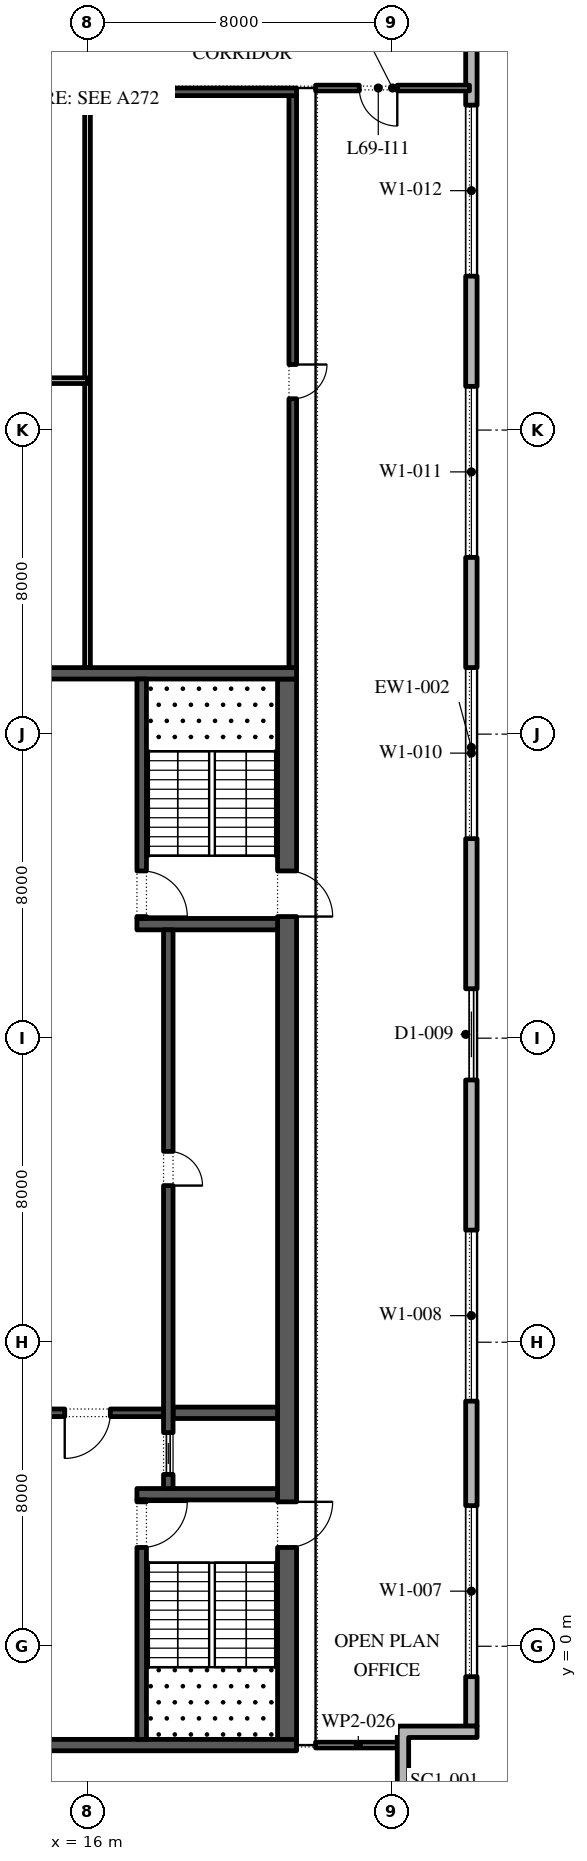
"""IFC4 building model, lengths in metres.
Left out: names, types, materials, properties, quantities, classifications, styles, units other than length and angle.
Written with IfcOpenShell. Run it as: python <this file> out.ifc"""

import sys

from ifc_helpers import new_model, si_unit, direction, frame, frame_2d, origin, place, context, subcontext, project, spatial, polyline, rectangle, outline, extrude, element, fill, save


model = new_model("IFC4")
c1 = context("Model", 3, precision=1e-05, world=origin(), true_north=direction((0.0, 1.0)))
c2 = subcontext(c1, "Body", "Model", "MODEL_VIEW")
j1 = project(units=[si_unit("LENGTHUNIT", "METRE"), si_unit("PLANEANGLEUNIT", "RADIAN")], contexts=[c1])
p1 = place(None, origin())
s1 = spatial("IfcSite", under=j1, at=p1, CompositionType="ELEMENT")
p2 = place(p1, origin())
s2 = spatial("IfcBuilding", under=s1, at=p2, CompositionType="ELEMENT")
p3 = place(p2, frame((0.0, 0.0, 317.4)))
s3 = spatial("IfcBuildingStorey", under=s2, at=p3, CompositionType="ELEMENT", Elevation=317.4)
p4 = place(p3, frame((26.1, -2.1, 0.0), z_axis=(0.0, 0.0, 1.0), x_axis=(0.0, 1.0, 0.0)))
e1 = element("IfcWall", 1, at=p4, inside=s3, PredefinedType="STANDARD", context=c2, shape_type="SweptSolid", body=[
    extrude(rectangle(XDim=51.5, YDim=0.3, at=frame_2d((25.75, 0.0))), origin(), (0.0, 0.0, 1.0), 4.0),
])
p5 = place(p4, frame((1.3, 0.0, 0.45)))
e2 = element("IfcOpeningElement", 2, at=p5, cuts=e1, PredefinedType="OPENING", context=c2, shape_type="SweptSolid", body=[
    extrude(rectangle(XDim=4.5, YDim=3.05, at=frame_2d((2.25, 1.525))), frame((0.0, 0.16, 0.0), z_axis=(0.0, -1.0, 0.0), x_axis=(1.0, 0.0, 0.0)), (0.0, 0.0, 1.0), 0.32),
])
p6 = place(p4, frame((8.55, 0.0, 0.45)))
e3 = element("IfcOpeningElement", 3, at=p6, cuts=e1, PredefinedType="OPENING", context=c2, shape_type="SweptSolid", body=[
    extrude(rectangle(XDim=4.5, YDim=3.05, at=frame_2d((2.25, 1.525))), frame((0.0, 0.16, 0.0), z_axis=(0.0, -1.0, 0.0), x_axis=(1.0, 0.0, 0.0)), (0.0, 0.0, 1.0), 0.32),
])
p7 = place(p4, frame((17.0, 0.0, 0.0)))
e4 = element("IfcOpeningElement", 4, at=p7, cuts=e1, PredefinedType="OPENING", context=c2, shape_type="SweptSolid", body=[
    extrude(rectangle(XDim=2.4, YDim=3.5, at=frame_2d((1.2, 1.75))), frame((0.0, 0.16, 0.0), z_axis=(0.0, -1.0, 0.0), x_axis=(1.0, 0.0, 0.0)), (0.0, 0.0, 1.0), 0.32),
])
p8 = place(p4, frame((23.35, 0.0, 0.45)))
e5 = element("IfcOpeningElement", 5, at=p8, cuts=e1, PredefinedType="OPENING", context=c2, shape_type="SweptSolid", body=[
    extrude(rectangle(XDim=4.5, YDim=3.05, at=frame_2d((2.25, 1.525))), frame((0.0, 0.16, 0.0), z_axis=(0.0, -1.0, 0.0), x_axis=(1.0, 0.0, 0.0)), (0.0, 0.0, 1.0), 0.32),
])
p9 = place(p4, frame((30.75, 0.0, 0.45)))
e6 = element("IfcOpeningElement", 6, at=p9, cuts=e1, PredefinedType="OPENING", context=c2, shape_type="SweptSolid", body=[
    extrude(rectangle(XDim=4.5, YDim=3.05, at=frame_2d((2.25, 1.525))), frame((0.0, 0.16, 0.0), z_axis=(0.0, -1.0, 0.0), x_axis=(1.0, 0.0, 0.0)), (0.0, 0.0, 1.0), 0.32),
])
p10 = place(p4, frame((38.15, 0.0, 0.45)))
e7 = element("IfcOpeningElement", 7, at=p10, cuts=e1, PredefinedType="OPENING", context=c2, shape_type="SweptSolid", body=[
    extrude(rectangle(XDim=4.5, YDim=3.05, at=frame_2d((2.25, 1.525))), frame((0.0, 0.16, 0.0), z_axis=(0.0, -1.0, 0.0), x_axis=(1.0, 0.0, 0.0)), (0.0, 0.0, 1.0), 0.32),
])
p11 = place(p4, frame((46.6, 0.0, 0.0)))
e8 = element("IfcOpeningElement", 8, at=p11, cuts=e1, PredefinedType="OPENING", context=c2, shape_type="SweptSolid", body=[
    extrude(rectangle(XDim=2.4, YDim=3.5, at=frame_2d((1.2, 1.75))), frame((0.0, 0.16, 0.0), z_axis=(0.0, -1.0, 0.0), x_axis=(1.0, 0.0, 0.0)), (0.0, 0.0, 1.0), 0.32),
])
p12 = place(p3, origin())
e9 = element("IfcWall", 9, at=p12, inside=s3, PredefinedType="STANDARD", context=c2, shape_type="SweptSolid", body=[
    extrude(outline(polyline([(24.15, -3.9), (24.15, -2.1), (26.25, -2.1), (26.25, -2.4), (24.45, -2.4), (24.45, -4.2), (22.65, -4.2), (22.65, -5.7), (22.35, -5.7), (22.35, -3.9), (24.15, -3.9)])), origin(), (0.0, 0.0, 1.0), 4.0),
])
p13 = place(p3, frame((21.25, -2.45, 0.0), z_axis=(0.0, 0.0, 1.0), x_axis=(0.0, 1.0, 0.0)))
e10 = element("IfcWall", 10, at=p13, inside=s3, PredefinedType="SHEAR", context=c2, shape_type="SweptSolid", body=[
    extrude(rectangle(XDim=27.9, YDim=0.5, at=frame_2d((13.95, 0.0))), origin(), (0.0, 0.0, 1.0), 4.0),
])
p14 = place(p13, frame((5.05, 0.0, 0.0)))
e11 = element("IfcOpeningElement", 11, at=p14, cuts=e10, PredefinedType="OPENING", context=c2, shape_type="SweptSolid", body=[
    extrude(rectangle(XDim=1.2, YDim=2.1, at=frame_2d((0.6, 1.05))), frame((0.0, 0.26, 0.0), z_axis=(0.0, -1.0, 0.0), x_axis=(1.0, 0.0, 0.0)), (0.0, 0.0, 1.0), 0.52),
])
p15 = place(p13, frame((21.65, 0.0, 0.0)))
e12 = element("IfcOpeningElement", 12, at=p15, cuts=e10, PredefinedType="OPENING", context=c2, shape_type="SweptSolid", body=[
    extrude(rectangle(XDim=1.2, YDim=2.1, at=frame_2d((0.6, 1.05))), frame((0.0, 0.26, 0.0), z_axis=(0.0, -1.0, 0.0), x_axis=(1.0, 0.0, 0.0)), (0.0, 0.0, 1.0), 0.52),
])
for number, where, z_axis, x_axis in (
    (13, (10.5, -2.6, 0.0), (0.0, 0.0, 1.0), (1.0, 0.0, 0.0)),
    (14, (10.5, 25.6, 0.0), (0.0, 0.0, 1.0), (1.0, 0.0, 0.0)),
):
    element("IfcWall", number, at=place(p3, frame(where, z_axis=z_axis, x_axis=x_axis)), inside=s3, PredefinedType="SHEAR", context=c2, shape_type="SweptSolid", body=[
        extrude(rectangle(XDim=11.0, YDim=0.3, at=frame_2d((5.5, 0.0))), origin(), (0.0, 0.0, 1.0), 4.0),
    ])
p16 = place(p3, frame((17.3, 4.0, 0.0), z_axis=(0.0, 0.0, 1.0), x_axis=(1.0, 0.0, 0.0)))
e15 = element("IfcWall", 15, at=p16, inside=s3, PredefinedType="SHEAR", context=c2, shape_type="SweptSolid", body=[
    extrude(rectangle(XDim=3.7, YDim=0.3, at=frame_2d((1.85, 0.0))), origin(), (0.0, 0.0, 1.0), 4.0),
])
p17 = place(p3, frame((17.425, -2.45, 0.0), z_axis=(0.0, 0.0, 1.0), x_axis=(0.0, 1.0, 0.0)))
e16 = element("IfcWall", 16, at=p17, inside=s3, PredefinedType="SHEAR", context=c2, shape_type="SweptSolid", body=[
    extrude(rectangle(XDim=6.3, YDim=0.25, at=frame_2d((3.15, 0.0))), origin(), (0.0, 0.0, 1.0), 4.0),
])
p18 = place(p17, frame((5.05, 0.0, 0.0)))
e17 = element("IfcOpeningElement", 17, at=p18, cuts=e16, PredefinedType="OPENING", context=c2, shape_type="SweptSolid", body=[
    extrude(rectangle(XDim=1.2, YDim=2.1, at=frame_2d((0.6, 1.05))), frame((0.0, 0.135, 0.0), z_axis=(0.0, -1.0, 0.0), x_axis=(1.0, 0.0, 0.0)), (0.0, 0.0, 1.0), 0.27),
])
p19 = place(p3, frame((17.3, 19.0, 0.0), z_axis=(0.0, 0.0, 1.0), x_axis=(1.0, 0.0, 0.0)))
e18 = element("IfcWall", 18, at=p19, inside=s3, PredefinedType="SHEAR", context=c2, shape_type="SweptSolid", body=[
    extrude(rectangle(XDim=3.7, YDim=0.3, at=frame_2d((1.85, 0.0))), origin(), (0.0, 0.0, 1.0), 4.0),
])
p20 = place(p3, frame((17.425, 19.15, 0.0), z_axis=(0.0, 0.0, 1.0), x_axis=(0.0, 1.0, 0.0)))
e19 = element("IfcWall", 19, at=p20, inside=s3, PredefinedType="SHEAR", context=c2, shape_type="SweptSolid", body=[
    extrude(rectangle(XDim=6.3, YDim=0.25, at=frame_2d((3.15, 0.0))), origin(), (0.0, 0.0, 1.0), 4.0),
])
p21 = place(p20, frame((0.05, 0.0, 0.0)))
e20 = element("IfcOpeningElement", 20, at=p21, cuts=e19, PredefinedType="OPENING", context=c2, shape_type="SweptSolid", body=[
    extrude(rectangle(XDim=1.2, YDim=2.1, at=frame_2d((0.6, 1.05))), frame((0.0, 0.135, 0.0), z_axis=(0.0, -1.0, 0.0), x_axis=(1.0, 0.0, 0.0)), (0.0, 0.0, 1.0), 0.27),
])
p22 = place(p3, frame((18.25, 6.143, 0.0), z_axis=(0.0, 0.0, 1.0), x_axis=(1.0, 0.0, 0.0)))
e21 = element("IfcWall", 21, at=p22, inside=s3, PredefinedType="SHEAR", context=c2, shape_type="SweptSolid", body=[
    extrude(rectangle(XDim=2.75, YDim=0.3, at=frame_2d((1.375, 0.0))), origin(), (0.0, 0.0, 1.0), 4.0),
])
p23 = place(p3, frame((18.125, 4.15, 0.0), z_axis=(0.0, 0.0, 1.0), x_axis=(0.0, 1.0, 0.0)))
e22 = element("IfcWall", 22, at=p23, inside=s3, PredefinedType="SHEAR", context=c2, shape_type="SweptSolid", body=[
    extrude(rectangle(XDim=14.7, YDim=0.25, at=frame_2d((7.35, 0.0))), origin(), (0.0, 0.0, 1.0), 4.0),
])
p24 = place(p23, frame((7.971, 0.0, 0.0)))
e23 = element("IfcOpeningElement", 23, at=p24, cuts=e22, PredefinedType="OPENING", context=c2, shape_type="SweptSolid", body=[
    extrude(rectangle(XDim=0.9, YDim=2.1, at=frame_2d((0.45, 1.05))), frame((0.0, 0.135, 0.0), z_axis=(0.0, -1.0, 0.0), x_axis=(1.0, 0.0, 0.0)), (0.0, 0.0, 1.0), 0.27),
])
p25 = place(p23, frame((0.371, 0.0, 0.0)))
e24 = element("IfcOpeningElement", 24, at=p25, cuts=e22, PredefinedType="OPENING", context=c2, shape_type="SweptSolid", body=[
    extrude(rectangle(XDim=1.1, YDim=2.1, at=frame_2d((0.55, 1.05))), frame((0.0, 0.135, 0.0), z_axis=(0.0, -1.0, 0.0), x_axis=(1.0, 0.0, 0.0)), (0.0, 0.0, 1.0), 0.27),
])
p26 = place(p3, frame((14.0, 6.143, 0.0), z_axis=(0.0, 0.0, 1.0), x_axis=(1.0, 0.0, 0.0)))
e25 = element("IfcWall", 25, at=p26, inside=s3, PredefinedType="SHEAR", context=c2, shape_type="SweptSolid", body=[
    extrude(rectangle(XDim=4.0, YDim=0.2, at=frame_2d((2.0, 0.0))), origin(), (0.0, 0.0, 1.0), 4.0),
])
p27 = place(p26, frame((1.4, 0.0, 0.0)))
e26 = element("IfcOpeningElement", 26, at=p27, cuts=e25, PredefinedType="OPENING", context=c2, shape_type="SweptSolid", body=[
    extrude(rectangle(XDim=1.2, YDim=2.1, at=frame_2d((0.6, 1.05))), frame((0.0, 0.11, 0.0), z_axis=(0.0, -1.0, 0.0), x_axis=(1.0, 0.0, 0.0)), (0.0, 0.0, 1.0), 0.22),
])
p28 = place(p3, frame((21.4, 25.75, 0.0), z_axis=(0.0, 0.0, 1.0), x_axis=(0.0, 1.0, 0.0)))
e27 = element("IfcWall", 27, at=p28, inside=s3, PredefinedType="SHEAR", context=c2, shape_type="SweptSolid", body=[
    extrude(rectangle(XDim=15.05, YDim=0.2, at=frame_2d((7.525, 0.0))), origin(), (0.0, 0.0, 1.0), 4.0),
])
p29 = place(p28, frame((7.075, 0.0, 0.0)))
e28 = element("IfcOpeningElement", 28, at=p29, cuts=e27, PredefinedType="OPENING", context=c2, shape_type="SweptSolid", body=[
    extrude(rectangle(XDim=0.9, YDim=2.1, at=frame_2d((0.45, 1.05))), frame((0.0, 0.11, 0.0), z_axis=(0.0, -1.0, 0.0), x_axis=(1.0, 0.0, 0.0)), (0.0, 0.0, 1.0), 0.22),
])
p30 = place(p3, frame((10.5, 40.9, 0.0), z_axis=(0.0, 0.0, 1.0), x_axis=(1.0, 0.0, 0.0)))
e29 = element("IfcWall", 29, at=p30, inside=s3, PredefinedType="SHEAR", context=c2, shape_type="SweptSolid", body=[
    extrude(rectangle(XDim=11.0, YDim=0.2, at=frame_2d((5.5, 0.0))), origin(), (0.0, 0.0, 1.0), 4.0),
])
p31 = place(p3, frame((16.0, 25.75, 0.0), z_axis=(0.0, 0.0, 1.0), x_axis=(0.0, 1.0, 0.0)))
e30 = element("IfcWall", 30, at=p31, inside=s3, PredefinedType="PARTITIONING", context=c2, shape_type="SweptSolid", body=[
    extrude(rectangle(XDim=15.05, YDim=0.15, at=frame_2d((7.525, 0.0))), origin(), (0.0, 0.0, 1.0), 4.0),
])
p32 = place(p3, frame((10.7, 33.3, 0.0), z_axis=(0.0, 0.0, 1.0), x_axis=(1.0, 0.0, 0.0)))
e31 = element("IfcWall", 31, at=p32, inside=s3, PredefinedType="PARTITIONING", context=c2, shape_type="SweptSolid", body=[
    extrude(rectangle(XDim=5.3, YDim=0.15, at=frame_2d((2.65, 0.0))), origin(), (0.0, 0.0, 1.0), 4.0),
])
p33 = place(p3, frame((22.0, -2.6, 0.0), z_axis=(0.0, 0.0, 1.0), x_axis=(1.0, 0.0, 0.0)))
e32 = element("IfcWall", 32, at=p33, inside=s3, PredefinedType="PARTITIONING", context=c2, shape_type="SweptSolid", body=[
    extrude(rectangle(XDim=2.25, YDim=0.15, at=frame_2d((1.125, 0.0))), origin(), (0.0, 0.0, 1.0), 4.0),
])
p34 = place(p3, frame((26.05, 41.0, 0.0), z_axis=(0.0, 0.0, 1.0), x_axis=(-1.0, 0.0, 0.0)))
e33 = element("IfcWall", 33, at=p34, inside=s3, PredefinedType="PARTITIONING", context=c2, shape_type="SweptSolid", body=[
    extrude(rectangle(XDim=4.05, YDim=0.15, at=frame_2d((2.025, 0.0))), origin(), (0.0, 0.0, 1.0), 4.0),
])
p35 = place(p34, frame((1.9, 0.0, 0.0)))
e34 = element("IfcOpeningElement", 34, at=p35, cuts=e33, PredefinedType="OPENING", context=c2, shape_type="SweptSolid", body=[
    extrude(rectangle(XDim=1.0, YDim=2.1, at=frame_2d((0.5, 1.05))), frame((0.0, 0.085, 0.0), z_axis=(0.0, -1.0, 0.0), x_axis=(1.0, 0.0, 0.0)), (0.0, 0.0, 1.0), 0.17),
])
p36 = place(p5, origin())
e35 = element("IfcWindow", 35, at=p36, inside=s3, PartitioningType="DOUBLE_PANEL_VERTICAL", PredefinedType="WINDOW", context=c2, shape_type="SweptSolid", body=[
    extrude(rectangle(XDim=4.5, YDim=3.05, at=frame_2d((2.25, 1.525))), frame((0.0, 0.03, 0.0), z_axis=(0.0, -1.0, 0.0), x_axis=(1.0, 0.0, 0.0)), (0.0, 0.0, 1.0), 0.06),
])
fill(e2, e35)
p37 = place(p6, origin())
e36 = element("IfcWindow", 36, at=p37, inside=s3, PartitioningType="DOUBLE_PANEL_VERTICAL", PredefinedType="WINDOW", context=c2, shape_type="SweptSolid", body=[
    extrude(rectangle(XDim=4.5, YDim=3.05, at=frame_2d((2.25, 1.525))), frame((0.0, 0.03, 0.0), z_axis=(0.0, -1.0, 0.0), x_axis=(1.0, 0.0, 0.0)), (0.0, 0.0, 1.0), 0.06),
])
fill(e3, e36)
p38 = place(p7, origin())
e37 = element("IfcDoor", 37, at=p38, inside=s3, OperationType="DOUBLE_DOOR_SLIDING", PredefinedType="DOOR", context=c2, shape_type="SweptSolid", body=[
    extrude(rectangle(XDim=2.4, YDim=3.5, at=frame_2d((1.2, 1.75))), frame((0.0, 0.025, 0.0), z_axis=(0.0, -1.0, 0.0), x_axis=(1.0, 0.0, 0.0)), (0.0, 0.0, 1.0), 0.05),
])
fill(e4, e37)
p39 = place(p8, origin())
e38 = element("IfcWindow", 38, at=p39, inside=s3, PartitioningType="DOUBLE_PANEL_VERTICAL", PredefinedType="WINDOW", context=c2, shape_type="SweptSolid", body=[
    extrude(rectangle(XDim=4.5, YDim=3.05, at=frame_2d((2.25, 1.525))), frame((0.0, 0.03, 0.0), z_axis=(0.0, -1.0, 0.0), x_axis=(1.0, 0.0, 0.0)), (0.0, 0.0, 1.0), 0.06),
])
fill(e5, e38)
p40 = place(p9, origin())
e39 = element("IfcWindow", 39, at=p40, inside=s3, PartitioningType="DOUBLE_PANEL_VERTICAL", PredefinedType="WINDOW", context=c2, shape_type="SweptSolid", body=[
    extrude(rectangle(XDim=4.5, YDim=3.05, at=frame_2d((2.25, 1.525))), frame((0.0, 0.03, 0.0), z_axis=(0.0, -1.0, 0.0), x_axis=(1.0, 0.0, 0.0)), (0.0, 0.0, 1.0), 0.06),
])
fill(e6, e39)
p41 = place(p10, origin())
e40 = element("IfcWindow", 40, at=p41, inside=s3, PartitioningType="DOUBLE_PANEL_VERTICAL", PredefinedType="WINDOW", context=c2, shape_type="SweptSolid", body=[
    extrude(rectangle(XDim=4.5, YDim=3.05, at=frame_2d((2.25, 1.525))), frame((0.0, 0.03, 0.0), z_axis=(0.0, -1.0, 0.0), x_axis=(1.0, 0.0, 0.0)), (0.0, 0.0, 1.0), 0.06),
])
fill(e7, e40)
p42 = place(p24, frame((0.9, -0.2, 0.0), z_axis=(0.0, 0.0, 1.0), x_axis=(-1.0, 0.0, 0.0)))
e41 = element("IfcDoor", 41, at=p42, inside=s3, OperationType="SINGLE_SWING_LEFT", PredefinedType="DOOR", context=c2, shape_type="SweptSolid", body=[
    extrude(rectangle(XDim=0.9, YDim=2.1, at=frame_2d((0.45, 1.05))), frame((0.0, -0.075, 0.0), z_axis=(0.0, -1.0, 0.0), x_axis=(1.0, 0.0, 0.0)), (0.0, 0.0, 1.0), 0.05),
])
fill(e23, e41)
p43 = place(p25, origin())
e42 = element("IfcDoor", 42, at=p43, inside=s3, OperationType="SLIDING_TO_LEFT", PredefinedType="DOOR", context=c2, shape_type="SweptSolid", body=[
    extrude(rectangle(XDim=1.1, YDim=2.1, at=frame_2d((0.55, 1.05))), frame((0.0, 0.025, 0.0), z_axis=(0.0, -1.0, 0.0), x_axis=(1.0, 0.0, 0.0)), (0.0, 0.0, 1.0), 0.05),
])
fill(e24, e42)
p44 = place(p27, frame((1.2, 0.0, 0.0), z_axis=(0.0, 0.0, 1.0), x_axis=(-1.0, 0.0, 0.0)))
e43 = element("IfcDoor", 43, at=p44, inside=s3, OperationType="SINGLE_SWING_LEFT", PredefinedType="DOOR", context=c2, shape_type="SweptSolid", body=[
    extrude(rectangle(XDim=1.2, YDim=2.1, at=frame_2d((0.6, 1.05))), frame((0.0, 0.025, 0.0), z_axis=(0.0, -1.0, 0.0), x_axis=(1.0, 0.0, 0.0)), (0.0, 0.0, 1.0), 0.05),
])
fill(e26, e43)
p45 = place(p18, frame((1.2, 0.0, 0.0), z_axis=(0.0, 0.0, 1.0), x_axis=(-1.0, 0.0, 0.0)))
e44 = element("IfcDoor", 44, at=p45, inside=s3, OperationType="SINGLE_SWING_RIGHT", PredefinedType="DOOR", context=c2, shape_type="SweptSolid", body=[
    extrude(rectangle(XDim=1.2, YDim=2.1, at=frame_2d((0.6, 1.05))), frame((0.0, 0.025, 0.0), z_axis=(0.0, -1.0, 0.0), x_axis=(1.0, 0.0, 0.0)), (0.0, 0.0, 1.0), 0.05),
])
fill(e17, e44)
p46 = place(p14, frame((1.2, 0.0, 0.0), z_axis=(0.0, 0.0, 1.0), x_axis=(-1.0, 0.0, 0.0)))
e45 = element("IfcDoor", 45, at=p46, inside=s3, OperationType="SINGLE_SWING_RIGHT", PredefinedType="DOOR", context=c2, shape_type="SweptSolid", body=[
    extrude(rectangle(XDim=1.2, YDim=2.1, at=frame_2d((0.6, 1.05))), frame((0.0, 0.025, 0.0), z_axis=(0.0, -1.0, 0.0), x_axis=(1.0, 0.0, 0.0)), (0.0, 0.0, 1.0), 0.05),
])
fill(e11, e45)
p47 = place(p21, frame((1.2, 0.0, 0.0), z_axis=(0.0, 0.0, 1.0), x_axis=(-1.0, 0.0, 0.0)))
e46 = element("IfcDoor", 46, at=p47, inside=s3, OperationType="SINGLE_SWING_LEFT", PredefinedType="DOOR", context=c2, shape_type="SweptSolid", body=[
    extrude(rectangle(XDim=1.2, YDim=2.1, at=frame_2d((0.6, 1.05))), frame((0.0, 0.025, 0.0), z_axis=(0.0, -1.0, 0.0), x_axis=(1.0, 0.0, 0.0)), (0.0, 0.0, 1.0), 0.05),
])
fill(e20, e46)
p48 = place(p15, frame((1.2, 0.0, 0.0), z_axis=(0.0, 0.0, 1.0), x_axis=(-1.0, 0.0, 0.0)))
e47 = element("IfcDoor", 47, at=p48, inside=s3, OperationType="SINGLE_SWING_LEFT", PredefinedType="DOOR", context=c2, shape_type="SweptSolid", body=[
    extrude(rectangle(XDim=1.2, YDim=2.1, at=frame_2d((0.6, 1.05))), frame((0.0, 0.025, 0.0), z_axis=(0.0, -1.0, 0.0), x_axis=(1.0, 0.0, 0.0)), (0.0, 0.0, 1.0), 0.05),
])
fill(e12, e47)
p49 = place(p29, frame((0.9, 0.15, 0.0), z_axis=(0.0, 0.0, 1.0), x_axis=(-1.0, 0.0, 0.0)))
e48 = element("IfcDoor", 48, at=p49, inside=s3, OperationType="SINGLE_SWING_RIGHT", PredefinedType="DOOR", context=c2, shape_type="SweptSolid", body=[
    extrude(rectangle(XDim=0.9, YDim=2.1, at=frame_2d((0.45, 1.05))), frame((0.0, 0.1, 0.0), z_axis=(0.0, -1.0, 0.0), x_axis=(1.0, 0.0, 0.0)), (0.0, 0.0, 1.0), 0.05),
])
fill(e28, e48)
p50 = place(p35, origin())
e49 = element("IfcDoor", 49, at=p50, inside=s3, OperationType="SINGLE_SWING_RIGHT", PredefinedType="DOOR", context=c2, shape_type="SweptSolid", body=[
    extrude(rectangle(XDim=1.0, YDim=2.1, at=frame_2d((0.5, 1.05))), frame((0.0, 0.025, 0.0), z_axis=(0.0, -1.0, 0.0), x_axis=(1.0, 0.0, 0.0)), (0.0, 0.0, 1.0), 0.05),
])
fill(e34, e49)
save(model, sys.argv[1])
